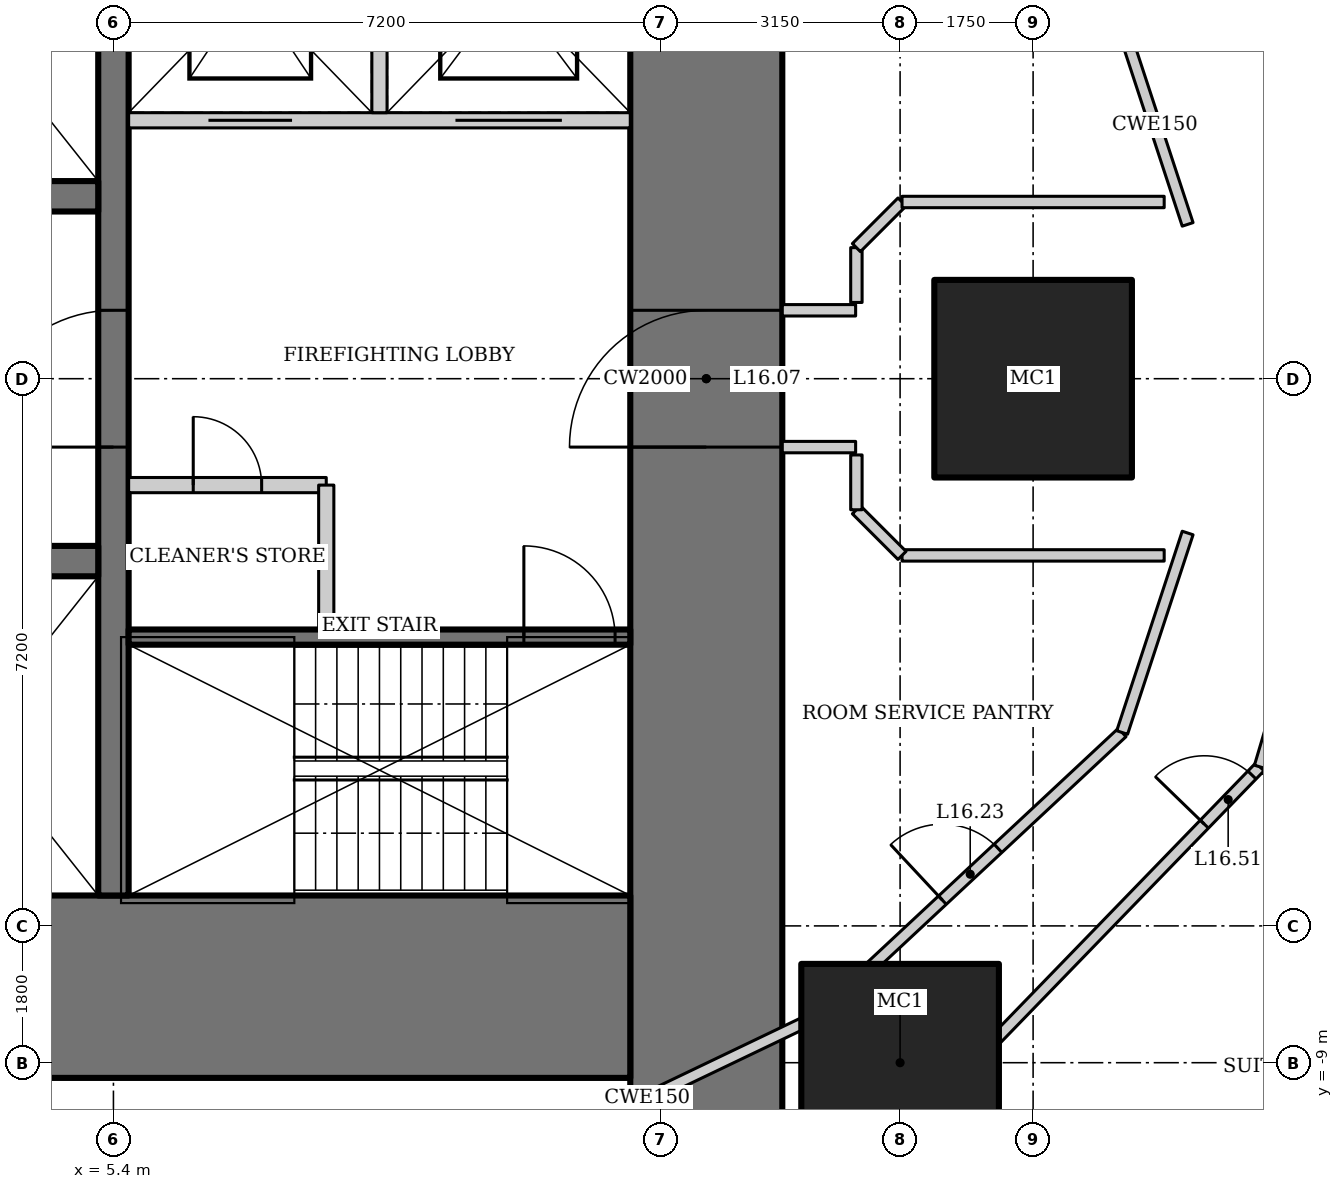
"""IFC4 building model, lengths in metres.
Left out: names, types, materials, properties, quantities, classifications, styles, units other than length and angle.
Written with IfcOpenShell. Run it as: python <this file> out.ifc"""

import sys

from ifc_helpers import new_model, si_unit, direction, frame, frame_2d, origin, origin_2d, place, context, subcontext, project, spatial, rectangle, hollow_rectangle, extrude, element, fill, save


model = new_model("IFC4")
c1 = context("Model", 3, precision=1e-05, world=origin(), true_north=direction((0.0, 1.0)))
c2 = subcontext(c1, "Body", "Model", "MODEL_VIEW")
j1 = project(units=[si_unit("LENGTHUNIT", "METRE"), si_unit("PLANEANGLEUNIT", "RADIAN")], contexts=[c1])
p1 = place(None, origin())
s1 = spatial("IfcSite", under=j1, at=p1, CompositionType="ELEMENT")
p2 = place(p1, origin())
s2 = spatial("IfcBuilding", under=s1, at=p2, CompositionType="ELEMENT")
p3 = place(p2, frame((0.0, 0.0, 73.0)))
s3 = spatial("IfcBuildingStorey", under=s2, at=p3, CompositionType="ELEMENT", Elevation=73.0)
for number, where, z_axis, x_axis in (
    (1, (17.5, 0.0, 0.0), (0.0, 0.0, 1.0), (1.0, 0.0, 0.0)),
    (2, (15.75, -9.0, 0.0), (0.0, 0.0, 1.0), (1.0, 0.0, 0.0)),
):
    element("IfcColumn", number, at=place(p3, frame(where, z_axis=z_axis, x_axis=x_axis)), inside=s3, PredefinedType="COLUMN", context=c2, shape_type="SweptSolid", body=[
        extrude(hollow_rectangle(XDim=2.6, YDim=2.6, WallThickness=0.13, at=origin_2d()), origin(), (0.0, 0.0, 1.0), 3.6),
    ])
p4 = place(p3, frame((13.2, -13.0, 0.0), z_axis=(0.0, 0.0, 1.0), x_axis=(0.0, 1.0, 0.0)))
e3 = element("IfcWall", 3, at=p4, inside=s3, PredefinedType="SHEAR", context=c2, shape_type="SweptSolid", body=[
    extrude(rectangle(XDim=26.0, YDim=2.0, at=frame_2d((13.0, 0.0))), origin(), (0.0, 0.0, 1.0), 3.6),
])
p5 = place(p4, frame((12.1, 0.0, 0.0)))
e4 = element("IfcOpeningElement", 4, at=p5, cuts=e3, PredefinedType="OPENING", context=c2, shape_type="SweptSolid", body=[
    extrude(rectangle(XDim=1.8, YDim=2.1, at=frame_2d((0.9, 1.05))), frame((0.0, 1.01, 0.0), z_axis=(0.0, -1.0, 0.0), x_axis=(1.0, 0.0, 0.0)), (0.0, 0.0, 1.0), 2.02),
])
p6 = place(p3, frame((-12.2, -8.0, 0.0), z_axis=(0.0, 0.0, 1.0), x_axis=(1.0, 0.0, 0.0)))
e5 = element("IfcWall", 5, at=p6, inside=s3, PredefinedType="SHEAR", context=c2, shape_type="SweptSolid", body=[
    extrude(rectangle(XDim=24.4, YDim=2.4, at=frame_2d((12.2, 0.0))), origin(), (0.0, 0.0, 1.0), 3.6),
])
p7 = place(p3, frame((5.4, -6.8, 0.0), z_axis=(0.0, 0.0, 1.0), x_axis=(0.0, 1.0, 0.0)))
e6 = element("IfcWall", 6, at=p7, inside=s3, PredefinedType="SHEAR", context=c2, shape_type="SweptSolid", body=[
    extrude(rectangle(XDim=13.6, YDim=0.4, at=frame_2d((6.8, 0.0))), origin(), (0.0, 0.0, 1.0), 3.6),
])
p8 = place(p7, frame((5.9, 0.0, 0.0)))
e7 = element("IfcOpeningElement", 7, at=p8, cuts=e6, PredefinedType="OPENING", context=c2, shape_type="SweptSolid", body=[
    extrude(rectangle(XDim=1.8, YDim=2.1, at=frame_2d((0.9, 1.05))), frame((0.0, 0.21, 0.0), z_axis=(0.0, -1.0, 0.0), x_axis=(1.0, 0.0, 0.0)), (0.0, 0.0, 1.0), 0.42),
])
p9 = place(p3, frame((-5.2, -2.4, 0.0), z_axis=(0.0, 0.0, 1.0), x_axis=(1.0, 0.0, 0.0)))
e8 = element("IfcWall", 8, at=p9, inside=s3, PredefinedType="SHEAR", context=c2, shape_type="SweptSolid", body=[
    extrude(rectangle(XDim=10.4, YDim=0.4, at=frame_2d((5.2, 0.0))), origin(), (0.0, 0.0, 1.0), 3.6),
])
p10 = place(p9, frame((0.55, 0.0, 0.0)))
e9 = element("IfcOpeningElement", 9, at=p10, cuts=e8, PredefinedType="OPENING", context=c2, shape_type="SweptSolid", body=[
    extrude(rectangle(XDim=1.1, YDim=2.2, at=frame_2d((0.55, 1.1))), frame((0.0, 0.21, 0.0), z_axis=(0.0, -1.0, 0.0), x_axis=(1.0, 0.0, 0.0)), (0.0, 0.0, 1.0), 0.42),
])
p11 = place(p9, frame((4.083, 0.0, 0.0)))
e10 = element("IfcOpeningElement", 10, at=p11, cuts=e8, PredefinedType="OPENING", context=c2, shape_type="SweptSolid", body=[
    extrude(rectangle(XDim=1.1, YDim=2.2, at=frame_2d((0.55, 1.1))), frame((0.0, 0.21, 0.0), z_axis=(0.0, -1.0, 0.0), x_axis=(1.0, 0.0, 0.0)), (0.0, 0.0, 1.0), 0.42),
])
p12 = place(p9, frame((7.617, 0.0, 0.0)))
e11 = element("IfcOpeningElement", 11, at=p12, cuts=e8, PredefinedType="OPENING", context=c2, shape_type="SweptSolid", body=[
    extrude(rectangle(XDim=1.1, YDim=2.2, at=frame_2d((0.55, 1.1))), frame((0.0, 0.21, 0.0), z_axis=(0.0, -1.0, 0.0), x_axis=(1.0, 0.0, 0.0)), (0.0, 0.0, 1.0), 0.42),
])
p13 = place(p3, frame((5.2, 2.4, 0.0), z_axis=(0.0, 0.0, 1.0), x_axis=(-1.0, 0.0, 0.0)))
e12 = element("IfcWall", 12, at=p13, inside=s3, PredefinedType="SHEAR", context=c2, shape_type="SweptSolid", body=[
    extrude(rectangle(XDim=10.4, YDim=0.4, at=frame_2d((5.2, 0.0))), origin(), (0.0, 0.0, 1.0), 3.6),
])
p14 = place(p3, frame((5.6, -3.4, 0.0), z_axis=(0.0, 0.0, 1.0), x_axis=(1.0, 0.0, 0.0)))
e13 = element("IfcWall", 13, at=p14, inside=s3, PredefinedType="SHEAR", context=c2, shape_type="SweptSolid", body=[
    extrude(rectangle(XDim=6.6, YDim=0.2, at=frame_2d((3.3, 0.0))), origin(), (0.0, 0.0, 1.0), 3.6),
])
p15 = place(p14, frame((5.2, 0.0, 0.0)))
e14 = element("IfcOpeningElement", 14, at=p15, cuts=e13, PredefinedType="OPENING", context=c2, shape_type="SweptSolid", body=[
    extrude(rectangle(XDim=1.2, YDim=2.1, at=frame_2d((0.6, 1.05))), frame((0.0, 0.11, 0.0), z_axis=(0.0, -1.0, 0.0), x_axis=(1.0, 0.0, 0.0)), (0.0, 0.0, 1.0), 0.22),
])
p16 = place(p3, frame((12.2, 3.4, 0.0), z_axis=(0.0, 0.0, 1.0), x_axis=(-1.0, 0.0, 0.0)))
e15 = element("IfcWall", 15, at=p16, inside=s3, PredefinedType="SOLIDWALL", context=c2, shape_type="SweptSolid", body=[
    extrude(rectangle(XDim=6.6, YDim=0.2, at=frame_2d((3.3, 0.0))), origin(), (0.0, 0.0, 1.0), 3.6),
])
p17 = place(p16, frame((4.45, 0.0, 0.0)))
e16 = element("IfcOpeningElement", 16, at=p17, cuts=e15, PredefinedType="OPENING", context=c2, shape_type="SweptSolid", body=[
    extrude(rectangle(XDim=1.1, YDim=2.2, at=frame_2d((0.55, 1.1))), frame((0.0, 0.11, 0.0), z_axis=(0.0, -1.0, 0.0), x_axis=(1.0, 0.0, 0.0)), (0.0, 0.0, 1.0), 0.22),
])
p18 = place(p16, frame((0.9, 0.0, 0.0)))
e17 = element("IfcOpeningElement", 17, at=p18, cuts=e15, PredefinedType="OPENING", context=c2, shape_type="SweptSolid", body=[
    extrude(rectangle(XDim=1.4, YDim=2.2, at=frame_2d((0.7, 1.1))), frame((0.0, 0.11, 0.0), z_axis=(0.0, -1.0, 0.0), x_axis=(1.0, 0.0, 0.0)), (0.0, 0.0, 1.0), 0.22),
])
p19 = place(p3, frame((8.9, 3.5, 0.0), z_axis=(0.0, 0.0, 1.0), x_axis=(0.0, 1.0, 0.0)))
e18 = element("IfcWall", 18, at=p19, inside=s3, PredefinedType="SOLIDWALL", context=c2, shape_type="SweptSolid", body=[
    extrude(rectangle(XDim=3.3, YDim=0.2, at=frame_2d((1.65, 0.0))), origin(), (0.0, 0.0, 1.0), 3.6),
])
p20 = place(p3, frame((5.6, -1.4, 0.0), z_axis=(0.0, 0.0, 1.0), x_axis=(1.0, 0.0, 0.0)))
e19 = element("IfcWall", 19, at=p20, inside=s3, PredefinedType="SOLIDWALL", context=c2, shape_type="SweptSolid", body=[
    extrude(rectangle(XDim=2.6, YDim=0.2, at=frame_2d((1.3, 0.0))), origin(), (0.0, 0.0, 1.0), 3.45),
])
p21 = place(p20, frame((0.85, 0.0, 0.0)))
e20 = element("IfcOpeningElement", 20, at=p21, cuts=e19, PredefinedType="OPENING", context=c2, shape_type="SweptSolid", body=[
    extrude(rectangle(XDim=0.9, YDim=2.1, at=frame_2d((0.45, 1.05))), frame((0.0, 0.11, 0.0), z_axis=(0.0, -1.0, 0.0), x_axis=(1.0, 0.0, 0.0)), (0.0, 0.0, 1.0), 0.22),
])
p22 = place(p3, frame((8.2, -1.4, 0.0), z_axis=(0.0, 0.0, 1.0), x_axis=(0.0, -1.0, 0.0)))
e21 = element("IfcWall", 21, at=p22, inside=s3, PredefinedType="SOLIDWALL", context=c2, shape_type="SweptSolid", body=[
    extrude(rectangle(XDim=1.9, YDim=0.2, at=frame_2d((0.95, 0.0))), origin(), (0.0, 0.0, 1.0), 3.45),
])
p23 = place(p3, frame((29.222, -7.254, 0.0), z_axis=(0.0, 0.0, 1.0), x_axis=(-0.971128703136, 0.238556160989, 0.0)))
e22 = element("IfcWall", 22, at=p23, inside=s3, PredefinedType="PARTITIONING", context=c2, shape_type="SweptSolid", body=[
    extrude(rectangle(XDim=8.998, YDim=0.15, at=frame_2d((4.499, 0.0))), origin(), (0.0, 0.0, 1.0), 2.333),
])
p24 = place(p3, frame((22.0, 0.0, 0.0), z_axis=(0.0, 0.0, 1.0), x_axis=(-0.284584469409, 0.95865096869, 0.0)))
e23 = element("IfcWall", 23, at=p24, inside=s3, PredefinedType="PARTITIONING", context=c2, shape_type="SweptSolid", body=[
    extrude(rectangle(XDim=5.327, YDim=0.15, at=frame_2d((2.664, 0.0))), origin(), (0.0, 0.0, 1.0), 3.45),
])
p25 = place(p3, frame((11.519, -11.928, 0.0), z_axis=(0.0, 0.0, 1.0), x_axis=(0.883334368785, 0.468743419071, 0.0)))
e24 = element("IfcWall", 24, at=p25, inside=s3, PredefinedType="PARTITIONING", context=c2, shape_type="SweptSolid", body=[
    extrude(rectangle(XDim=5.491, YDim=0.15, at=frame_2d((2.746, 0.0))), origin(), (0.0, 0.0, 1.0), 3.45),
])
p26 = place(p3, frame((16.369, -9.354, 0.0), z_axis=(0.0, 0.0, 1.0), x_axis=(0.695871090686, 0.71816671125, 0.0)))
e25 = element("IfcWall", 25, at=p26, inside=s3, PredefinedType="PARTITIONING", context=c2, shape_type="SweptSolid", body=[
    extrude(rectangle(XDim=5.913, YDim=0.15, at=frame_2d((2.957, 0.0))), origin(), (0.0, 0.0, 1.0), 3.45),
])
p27 = place(p26, frame((4.863, 0.0, 0.0)))
e26 = element("IfcOpeningElement", 26, at=p27, cuts=e25, PredefinedType="OPENING", context=c2, shape_type="SweptSolid", body=[
    extrude(rectangle(XDim=0.9, YDim=2.1, at=frame_2d((0.45, 1.05))), frame((0.0, 0.085, 0.0), z_axis=(0.0, -1.0, 0.0), x_axis=(1.0, 0.0, 0.0)), (0.0, 0.0, 1.0), 0.17),
])
p28 = place(p3, frame((20.484, -5.107, 0.0), z_axis=(0.0, 0.0, 1.0), x_axis=(0.284584469409, 0.95865096869, 0.0)))
e27 = element("IfcWall", 27, at=p28, inside=s3, PredefinedType="PARTITIONING", context=c2, shape_type="SweptSolid", body=[
    extrude(rectangle(XDim=5.327, YDim=0.15, at=frame_2d((2.664, 0.0))), origin(), (0.0, 0.0, 1.0), 3.45),
])
p29 = place(p28, frame((4.278, 0.0, 0.0)))
e28 = element("IfcOpeningElement", 28, at=p29, cuts=e27, PredefinedType="OPENING", context=c2, shape_type="SweptSolid", body=[
    extrude(rectangle(XDim=0.9, YDim=2.1, at=frame_2d((0.45, 1.05))), frame((0.0, 0.085, 0.0), z_axis=(0.0, -1.0, 0.0), x_axis=(1.0, 0.0, 0.0)), (0.0, 0.0, 1.0), 0.17),
])
p30 = place(p3, frame((10.177, -10.539, 0.0), z_axis=(0.0, 0.0, 1.0), x_axis=(0.901869692799, 0.43200816799, 0.0)))
e29 = element("IfcWall", 29, at=p30, inside=s3, PredefinedType="PARTITIONING", context=c2, shape_type="SweptSolid", body=[
    extrude(rectangle(XDim=4.986, YDim=0.15, at=frame_2d((2.493, 0.0))), origin(), (0.0, 0.0, 1.0), 3.45),
])
p31 = place(p3, frame((14.673, -8.385, 0.0), z_axis=(0.0, 0.0, 1.0), x_axis=(0.731260145007, 0.682098673452, 0.0)))
e30 = element("IfcWall", 30, at=p31, inside=s3, PredefinedType="PARTITIONING", context=c2, shape_type="SweptSolid", body=[
    extrude(rectangle(XDim=5.468, YDim=0.15, at=frame_2d((2.734, 0.0))), origin(), (0.0, 0.0, 1.0), 3.45),
])
p32 = place(p31, frame((2.234, 0.0, 0.0)))
e31 = element("IfcOpeningElement", 31, at=p32, cuts=e30, PredefinedType="OPENING", context=c2, shape_type="SweptSolid", body=[
    extrude(rectangle(XDim=1.0, YDim=2.1, at=frame_2d((0.5, 1.05))), frame((0.0, 0.085, 0.0), z_axis=(0.0, -1.0, 0.0), x_axis=(1.0, 0.0, 0.0)), (0.0, 0.0, 1.0), 0.17),
])
p33 = place(p3, frame((23.171, -13.24, 0.0), z_axis=(0.0, 0.0, 1.0), x_axis=(-0.868243142124, 0.496138938357, 0.0)))
e32 = element("IfcWall", 32, at=p33, inside=s3, PredefinedType="PARTITIONING", context=c2, shape_type="SweptSolid", body=[
    extrude(rectangle(XDim=7.834, YDim=0.1, at=frame_2d((3.917, 0.0))), origin(), (0.0, 0.0, 1.0), 2.693),
])
p34 = place(p33, frame((3.467, 0.0, 0.0)))
e33 = element("IfcOpeningElement", 33, at=p34, cuts=e32, PredefinedType="OPENING", context=c2, shape_type="SweptSolid", body=[
    extrude(rectangle(XDim=0.9, YDim=2.1, at=frame_2d((0.45, 1.05))), frame((0.0, 0.06, 0.0), z_axis=(0.0, -1.0, 0.0), x_axis=(1.0, 0.0, 0.0)), (0.0, 0.0, 1.0), 0.12),
])
for number, where, z_axis, x_axis in (
    (34, (19.533, 2.03, 0.0), (0.0, 0.0, 1.0), (-0.312, 0.95, 0.0)),
    (35, (18.672, -4.655, 0.0), (0.0, 0.0, 1.0), (0.312, 0.95, 0.0)),
):
    element("IfcWall", number, at=place(p3, frame(where, z_axis=z_axis, x_axis=x_axis)), inside=s3, PredefinedType="PARTITIONING", context=c2, shape_type="SweptSolid", body=[
        extrude(rectangle(XDim=2.763, YDim=0.15, at=frame_2d((1.381, 0.0))), origin(), (0.0, 0.0, 1.0), 3.45),
    ])
for number, where, z_axis, x_axis in (
    (36, (14.2, -0.9, 0.0), (0.0, 0.0, 1.0), (1.0, 0.0, 0.0)),
    (37, (14.2, 0.9, 0.0), (0.0, 0.0, 1.0), (1.0, 0.0, 0.0)),
):
    element("IfcWall", number, at=place(p3, frame(where, z_axis=z_axis, x_axis=x_axis)), inside=s3, PredefinedType="PARTITIONING", context=c2, shape_type="SweptSolid", body=[
        extrude(rectangle(XDim=0.965, YDim=0.15, at=frame_2d((0.482, 0.0))), origin(), (0.0, 0.0, 1.0), 3.45),
    ])
p35 = place(p3, frame((15.175, 1.003, 0.0), z_axis=(0.0, 0.0, 1.0), x_axis=(0.0, 1.0, 0.0)))
e38 = element("IfcWall", 38, at=p35, inside=s3, PredefinedType="PARTITIONING", context=c2, shape_type="SweptSolid", body=[
    extrude(rectangle(XDim=0.721, YDim=0.15, at=frame_2d((0.361, 0.0))), origin(), (0.0, 0.0, 1.0), 3.45),
])
p36 = place(p3, frame((15.175, 1.725, 0.0), z_axis=(0.0, 0.0, 1.0), x_axis=(0.707106781187, 0.707106781187, 0.0)))
e39 = element("IfcWall", 39, at=p36, inside=s3, PredefinedType="PARTITIONING", context=c2, shape_type="SweptSolid", body=[
    extrude(rectangle(XDim=0.849, YDim=0.15, at=frame_2d((0.425, 0.0))), origin(), (0.0, 0.0, 1.0), 3.45),
])
for number, where, z_axis, x_axis in (
    (40, (15.775, 2.325, 0.0), (0.0, 0.0, 1.0), (1.0, 0.0, 0.0)),
    (41, (19.225, -2.325, 0.0), (0.0, 0.0, 1.0), (-1.0, 0.0, 0.0)),
):
    element("IfcWall", number, at=place(p3, frame(where, z_axis=z_axis, x_axis=x_axis)), inside=s3, PredefinedType="PARTITIONING", context=c2, shape_type="SweptSolid", body=[
        extrude(rectangle(XDim=3.449, YDim=0.15, at=frame_2d((1.725, 0.0))), origin(), (0.0, 0.0, 1.0), 3.45),
    ])
p37 = place(p3, frame((15.775, -2.325, 0.0), z_axis=(0.0, 0.0, 1.0), x_axis=(-0.707106781187, 0.707106781187, 0.0)))
e42 = element("IfcWall", 42, at=p37, inside=s3, PredefinedType="PARTITIONING", context=c2, shape_type="SweptSolid", body=[
    extrude(rectangle(XDim=0.849, YDim=0.15, at=frame_2d((0.425, 0.0))), origin(), (0.0, 0.0, 1.0), 3.45),
])
p38 = place(p3, frame((15.175, -1.725, 0.0), z_axis=(0.0, 0.0, 1.0), x_axis=(0.0, 1.0, 0.0)))
e43 = element("IfcWall", 43, at=p38, inside=s3, PredefinedType="PARTITIONING", context=c2, shape_type="SweptSolid", body=[
    extrude(rectangle(XDim=0.721, YDim=0.15, at=frame_2d((0.361, 0.0))), origin(), (0.0, 0.0, 1.0), 3.45),
])
p39 = place(p21, origin())
e44 = element("IfcDoor", 44, at=p39, inside=s3, OperationType="SINGLE_SWING_LEFT", PredefinedType="DOOR", context=c2, shape_type="SweptSolid", body=[
    extrude(rectangle(XDim=0.9, YDim=2.1, at=frame_2d((0.45, 1.05))), frame((0.0, 0.025, 0.0), z_axis=(0.0, -1.0, 0.0), x_axis=(1.0, 0.0, 0.0)), (0.0, 0.0, 1.0), 0.05),
])
fill(e20, e44)
p40 = place(p8, origin())
e45 = element("IfcDoor", 45, at=p40, inside=s3, OperationType="DOUBLE_DOOR_DOUBLE_SWING", PredefinedType="DOOR", context=c2, shape_type="SweptSolid", body=[
    extrude(rectangle(XDim=1.8, YDim=2.1, at=frame_2d((0.9, 1.05))), frame((0.0, 0.025, 0.0), z_axis=(0.0, -1.0, 0.0), x_axis=(1.0, 0.0, 0.0)), (0.0, 0.0, 1.0), 0.05),
])
fill(e7, e45)
p41 = place(p15, origin())
e46 = element("IfcDoor", 46, at=p41, inside=s3, OperationType="SINGLE_SWING_RIGHT", PredefinedType="DOOR", context=c2, shape_type="SweptSolid", body=[
    extrude(rectangle(XDim=1.2, YDim=2.1, at=frame_2d((0.6, 1.05))), frame((0.0, 0.025, 0.0), z_axis=(0.0, -1.0, 0.0), x_axis=(1.0, 0.0, 0.0)), (0.0, 0.0, 1.0), 0.05),
])
fill(e14, e46)
p42 = place(p5, origin())
e47 = element("IfcDoor", 47, at=p42, inside=s3, OperationType="DOUBLE_DOOR_DOUBLE_SWING", PredefinedType="DOOR", context=c2, shape_type="SweptSolid", body=[
    extrude(rectangle(XDim=1.8, YDim=2.1, at=frame_2d((0.9, 1.05))), frame((0.0, 0.025, 0.0), z_axis=(0.0, -1.0, 0.0), x_axis=(1.0, 0.0, 0.0)), (0.0, 0.0, 1.0), 0.05),
])
fill(e4, e47)
p43 = place(p17, origin())
e48 = element("IfcDoor", 48, at=p43, inside=s3, OperationType="DOUBLE_DOOR_SLIDING", PredefinedType="DOOR", context=c2, shape_type="SweptSolid", body=[
    extrude(rectangle(XDim=1.1, YDim=2.2, at=frame_2d((0.55, 1.1))), frame((0.0, 0.025, 0.0), z_axis=(0.0, -1.0, 0.0), x_axis=(1.0, 0.0, 0.0)), (0.0, 0.0, 1.0), 0.05),
])
fill(e16, e48)
p44 = place(p18, origin())
e49 = element("IfcDoor", 49, at=p44, inside=s3, OperationType="DOUBLE_DOOR_SLIDING", PredefinedType="DOOR", context=c2, shape_type="SweptSolid", body=[
    extrude(rectangle(XDim=1.4, YDim=2.2, at=frame_2d((0.7, 1.1))), frame((0.0, 0.025, 0.0), z_axis=(0.0, -1.0, 0.0), x_axis=(1.0, 0.0, 0.0)), (0.0, 0.0, 1.0), 0.05),
])
fill(e17, e49)
p45 = place(p32, origin())
e50 = element("IfcDoor", 50, at=p45, inside=s3, OperationType="SINGLE_SWING_LEFT", PredefinedType="DOOR", context=c2, shape_type="SweptSolid", body=[
    extrude(rectangle(XDim=1.0, YDim=2.1, at=frame_2d((0.5, 1.05))), frame((0.0, 0.025, 0.0), z_axis=(0.0, -1.0, 0.0), x_axis=(1.0, 0.0, 0.0)), (0.0, 0.0, 1.0), 0.05),
])
fill(e31, e50)
p46 = place(p27, origin())
e51 = element("IfcDoor", 51, at=p46, inside=s3, OperationType="SINGLE_SWING_LEFT", PredefinedType="DOOR", context=c2, shape_type="SweptSolid", body=[
    extrude(rectangle(XDim=0.9, YDim=2.1, at=frame_2d((0.45, 1.05))), frame((0.0, 0.025, 0.0), z_axis=(0.0, -1.0, 0.0), x_axis=(1.0, 0.0, 0.0)), (0.0, 0.0, 1.0), 0.05),
])
fill(e26, e51)
save(model, sys.argv[1])
